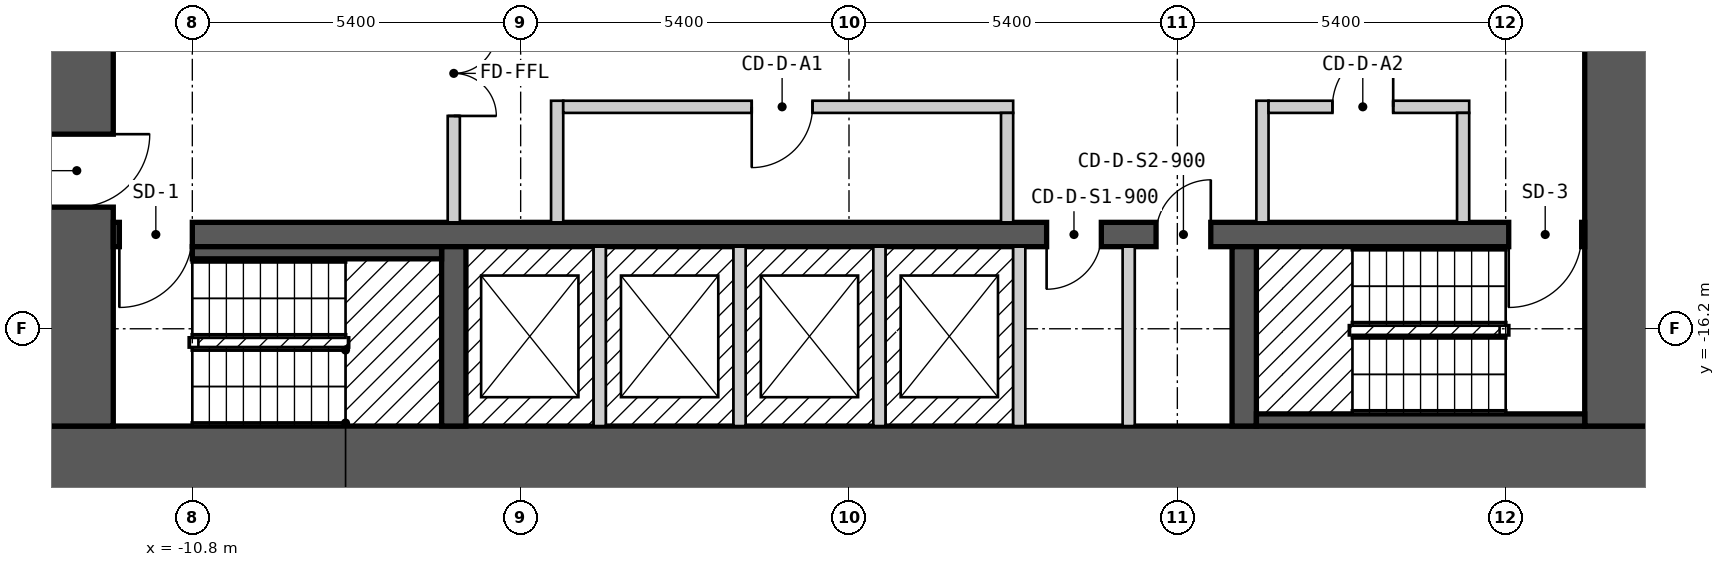
"""IFC4 building model, lengths in metres.
Left out: names, types, materials, properties, quantities, classifications, styles, units other than length and angle.
Written with IfcOpenShell. Run it as: python <this file> out.ifc"""

import sys

from ifc_helpers import new_model, si_unit, direction, frame, frame_2d, origin, place, context, subcontext, project, spatial, rectangle, extrude, element, fill, save


model = new_model("IFC4")
c1 = context("Model", 3, precision=1e-05, world=origin(), true_north=direction((0.0, 1.0)))
c2 = subcontext(c1, "Body", "Model", "MODEL_VIEW")
j1 = project(units=[si_unit("LENGTHUNIT", "METRE"), si_unit("PLANEANGLEUNIT", "RADIAN")], contexts=[c1])
p1 = place(None, origin())
s1 = spatial("IfcSite", under=j1, at=p1, CompositionType="ELEMENT")
p2 = place(p1, origin())
s2 = spatial("IfcBuilding", under=s1, at=p2, CompositionType="ELEMENT")
p3 = place(p2, frame((0.0, 0.0, 19.8)))
s3 = spatial("IfcBuildingStorey", under=s2, at=p3, CompositionType="ELEMENT", Elevation=19.8)
p4 = place(p3, frame((-13.3, -18.4, 0.0), z_axis=(0.0, 0.0, 1.0), x_axis=(1.0, 0.0, 0.0)))
e1 = element("IfcWall", 1, at=p4, inside=s3, PredefinedType="SHEAR", context=c2, shape_type="SweptSolid", body=[
    extrude(rectangle(XDim=26.6, YDim=1.2, at=frame_2d((13.3, 0.0))), origin(), (0.0, 0.0, 1.0), 2.8),
])
p5 = place(p3, frame((-12.7, -17.8, 0.0), z_axis=(0.0, 0.0, 1.0), x_axis=(0.0, 1.0, 0.0)))
e2 = element("IfcWall", 2, at=p5, inside=s3, PredefinedType="SHEAR", context=c2, shape_type="SweptSolid", body=[
    extrude(rectangle(XDim=11.6, YDim=1.2, at=frame_2d((5.8, 0.0))), origin(), (0.0, 0.0, 1.0), 2.8),
])
p6 = place(p5, frame((3.6, 0.0, 0.0)))
e3 = element("IfcOpeningElement", 3, at=p6, cuts=e2, PredefinedType="OPENING", context=c2, shape_type="SweptSolid", body=[
    extrude(rectangle(XDim=1.2, YDim=2.1, at=frame_2d((0.6, 1.05))), frame((0.0, 0.61, 0.0), z_axis=(0.0, -1.0, 0.0), x_axis=(1.0, 0.0, 0.0)), (0.0, 0.0, 1.0), 1.22),
])
p7 = place(p3, frame((12.7, -17.8, 0.0), z_axis=(0.0, 0.0, 1.0), x_axis=(0.0, 1.0, 0.0)))
e4 = element("IfcWall", 4, at=p7, inside=s3, PredefinedType="SHEAR", context=c2, shape_type="SweptSolid", body=[
    extrude(rectangle(XDim=11.6, YDim=1.2, at=frame_2d((5.8, 0.0))), origin(), (0.0, 0.0, 1.0), 2.8),
])
p8 = place(p3, frame((-12.1, -14.65, 0.0), z_axis=(0.0, 0.0, 1.0), x_axis=(1.0, 0.0, 0.0)))
e5 = element("IfcWall", 5, at=p8, inside=s3, PredefinedType="SHEAR", context=c2, shape_type="SweptSolid", body=[
    extrude(rectangle(XDim=24.2, YDim=0.4, at=frame_2d((12.1, 0.0))), origin(), (0.0, 0.0, 1.0), 2.8),
])
p9 = place(p8, frame((1.3, 0.0, 0.0), z_axis=(0.0, 0.0, 1.0), x_axis=(-1.0, 0.0, 0.0)))
e6 = element("IfcOpeningElement", 6, at=p9, cuts=e5, PredefinedType="OPENING", context=c2, shape_type="SweptSolid", body=[
    extrude(rectangle(XDim=1.2, YDim=2.1, at=frame_2d((0.6, 1.05))), frame((0.0, 0.21, 0.0), z_axis=(0.0, -1.0, 0.0), x_axis=(1.0, 0.0, 0.0)), (0.0, 0.0, 1.0), 0.42),
])
p10 = place(p8, frame((24.15, 0.0, 0.0), z_axis=(0.0, 0.0, 1.0), x_axis=(-1.0, 0.0, 0.0)))
e7 = element("IfcOpeningElement", 7, at=p10, cuts=e5, PredefinedType="OPENING", context=c2, shape_type="SweptSolid", body=[
    extrude(rectangle(XDim=1.2, YDim=2.1, at=frame_2d((0.6, 1.05))), frame((0.0, 0.21, 0.0), z_axis=(0.0, -1.0, 0.0), x_axis=(1.0, 0.0, 0.0)), (0.0, 0.0, 1.0), 0.42),
])
p11 = place(p8, frame((16.25, 0.0, 0.0), z_axis=(0.0, 0.0, 1.0), x_axis=(-1.0, 0.0, 0.0)))
e8 = element("IfcOpeningElement", 8, at=p11, cuts=e5, PredefinedType="OPENING", context=c2, shape_type="SweptSolid", body=[
    extrude(rectangle(XDim=0.9, YDim=2.1, at=frame_2d((0.45, 1.05))), frame((0.0, 0.21, 0.0), z_axis=(0.0, -1.0, 0.0), x_axis=(1.0, 0.0, 0.0)), (0.0, 0.0, 1.0), 0.42),
])
p12 = place(p8, frame((18.05, 0.0, 0.0), z_axis=(0.0, 0.0, 1.0), x_axis=(-1.0, 0.0, 0.0)))
e9 = element("IfcOpeningElement", 9, at=p12, cuts=e5, PredefinedType="OPENING", context=c2, shape_type="SweptSolid", body=[
    extrude(rectangle(XDim=0.9, YDim=2.1, at=frame_2d((0.45, 1.05))), frame((0.0, 0.21, 0.0), z_axis=(0.0, -1.0, 0.0), x_axis=(1.0, 0.0, 0.0)), (0.0, 0.0, 1.0), 0.42),
])
for number, where, z_axis, x_axis in (
    (10, (-6.5, -17.8, 0.0), (0.0, 0.0, 1.0), (0.0, 1.0, 0.0)),
    (11, (6.5, -17.8, 0.0), (0.0, 0.0, 1.0), (0.0, 1.0, 0.0)),
):
    element("IfcWall", number, at=place(p3, frame(where, z_axis=z_axis, x_axis=x_axis)), inside=s3, PredefinedType="SHEAR", context=c2, shape_type="SweptSolid", body=[
        extrude(rectangle(XDim=2.95, YDim=0.4, at=frame_2d((1.475, 0.0))), origin(), (0.0, 0.0, 1.0), 2.8),
    ])
p13 = place(p3, frame((-10.8, -14.95, 0.0), z_axis=(0.0, 0.0, 1.0), x_axis=(1.0, 0.0, 0.0)))
e12 = element("IfcWall", 12, at=p13, inside=s3, PredefinedType="SOLIDWALL", context=c2, shape_type="SweptSolid", body=[
    extrude(rectangle(XDim=4.1, YDim=0.2, at=frame_2d((2.05, 0.0))), origin(), (0.0, 0.0, 1.0), 2.8),
])
p14 = place(p3, frame((-6.5, -14.45, 0.0), z_axis=(0.0, 0.0, 1.0), x_axis=(0.0, 1.0, 0.0)))
e13 = element("IfcWall", 13, at=p14, inside=s3, PredefinedType="PARTITIONING", context=c2, shape_type="SweptSolid", body=[
    extrude(rectangle(XDim=4.9, YDim=0.2, at=frame_2d((2.45, 0.0))), origin(), (0.0, 0.0, 1.0), 2.8),
])
p15 = place(p14, frame((3.15, 0.0, 0.0), z_axis=(0.0, 0.0, 1.0), x_axis=(-1.0, 0.0, 0.0)))
e14 = element("IfcOpeningElement", 14, at=p15, cuts=e13, PredefinedType="OPENING", context=c2, shape_type="SweptSolid", body=[
    extrude(rectangle(XDim=1.4, YDim=2.1, at=frame_2d((0.7, 1.05))), frame((0.0, 0.11, 0.0), z_axis=(0.0, -1.0, 0.0), x_axis=(1.0, 0.0, 0.0)), (0.0, 0.0, 1.0), 0.22),
])
p16 = place(p3, frame((-4.8, -14.45, 0.0), z_axis=(0.0, 0.0, 1.0), x_axis=(0.0, 1.0, 0.0)))
e15 = element("IfcWall", 15, at=p16, inside=s3, PredefinedType="PARTITIONING", context=c2, shape_type="SweptSolid", body=[
    extrude(rectangle(XDim=2.0, YDim=0.2, at=frame_2d((1.0, 0.0))), origin(), (0.0, 0.0, 1.0), 2.8),
])
p17 = place(p3, frame((-4.7, -12.55, 0.0), z_axis=(0.0, 0.0, 1.0), x_axis=(1.0, 0.0, 0.0)))
e16 = element("IfcWall", 16, at=p17, inside=s3, PredefinedType="PARTITIONING", context=c2, shape_type="SweptSolid", body=[
    extrude(rectangle(XDim=7.4, YDim=0.2, at=frame_2d((3.7, 0.0))), origin(), (0.0, 0.0, 1.0), 2.8),
])
p18 = place(p17, frame((4.1, 0.0, 0.0), z_axis=(0.0, 0.0, 1.0), x_axis=(-1.0, 0.0, 0.0)))
e17 = element("IfcOpeningElement", 17, at=p18, cuts=e16, PredefinedType="OPENING", context=c2, shape_type="SweptSolid", body=[
    extrude(rectangle(XDim=1.0, YDim=2.1, at=frame_2d((0.5, 1.05))), frame((0.0, 0.11, 0.0), z_axis=(0.0, -1.0, 0.0), x_axis=(1.0, 0.0, 0.0)), (0.0, 0.0, 1.0), 0.22),
])
for number, where, z_axis, x_axis in (
    (18, (-4.1, -17.8, 0.0), (0.0, 0.0, 1.0), (0.0, 1.0, 0.0)),
    (19, (-1.8, -17.8, 0.0), (0.0, 0.0, 1.0), (0.0, 1.0, 0.0)),
    (20, (0.5, -17.8, 0.0), (0.0, 0.0, 1.0), (0.0, 1.0, 0.0)),
):
    element("IfcWall", number, at=place(p3, frame(where, z_axis=z_axis, x_axis=x_axis)), inside=s3, PredefinedType="SOLIDWALL", context=c2, shape_type="SweptSolid", body=[
        extrude(rectangle(XDim=2.95, YDim=0.2, at=frame_2d((1.475, 0.0))), origin(), (0.0, 0.0, 1.0), 2.8),
    ])
p19 = place(p3, frame((2.6, -14.45, 0.0), z_axis=(0.0, 0.0, 1.0), x_axis=(0.0, 1.0, 0.0)))
e21 = element("IfcWall", 21, at=p19, inside=s3, PredefinedType="PARTITIONING", context=c2, shape_type="SweptSolid", body=[
    extrude(rectangle(XDim=1.8, YDim=0.2, at=frame_2d((0.9, 0.0))), origin(), (0.0, 0.0, 1.0), 2.8),
])
p20 = place(p3, frame((2.8, -17.8, 0.0), z_axis=(0.0, 0.0, 1.0), x_axis=(0.0, 1.0, 0.0)))
e22 = element("IfcWall", 22, at=p20, inside=s3, PredefinedType="SOLIDWALL", context=c2, shape_type="SweptSolid", body=[
    extrude(rectangle(XDim=2.95, YDim=0.2, at=frame_2d((1.475, 0.0))), origin(), (0.0, 0.0, 1.0), 2.8),
])
p21 = place(p3, frame((4.6, -17.8, 0.0), z_axis=(0.0, 0.0, 1.0), x_axis=(0.0, 1.0, 0.0)))
e23 = element("IfcWall", 23, at=p21, inside=s3, PredefinedType="PARTITIONING", context=c2, shape_type="SweptSolid", body=[
    extrude(rectangle(XDim=2.95, YDim=0.2, at=frame_2d((1.475, 0.0))), origin(), (0.0, 0.0, 1.0), 2.8),
])
p22 = place(p3, frame((6.7, -17.7, 0.0), z_axis=(0.0, 0.0, 1.0), x_axis=(1.0, 0.0, 0.0)))
e24 = element("IfcWall", 24, at=p22, inside=s3, PredefinedType="SOLIDWALL", context=c2, shape_type="SweptSolid", body=[
    extrude(rectangle(XDim=5.4, YDim=0.2, at=frame_2d((2.7, 0.0))), origin(), (0.0, 0.0, 1.0), 2.8),
])
p23 = place(p3, frame((6.8, -14.45, 0.0), z_axis=(0.0, 0.0, 1.0), x_axis=(0.0, 1.0, 0.0)))
e25 = element("IfcWall", 25, at=p23, inside=s3, PredefinedType="PARTITIONING", context=c2, shape_type="SweptSolid", body=[
    extrude(rectangle(XDim=2.0, YDim=0.2, at=frame_2d((1.0, 0.0))), origin(), (0.0, 0.0, 1.0), 2.8),
])
p24 = place(p3, frame((6.9, -12.55, 0.0), z_axis=(0.0, 0.0, 1.0), x_axis=(1.0, 0.0, 0.0)))
e26 = element("IfcWall", 26, at=p24, inside=s3, PredefinedType="PARTITIONING", context=c2, shape_type="SweptSolid", body=[
    extrude(rectangle(XDim=3.3, YDim=0.2, at=frame_2d((1.65, 0.0))), origin(), (0.0, 0.0, 1.0), 2.8),
])
p25 = place(p24, frame((2.05, 0.0, 0.0), z_axis=(0.0, 0.0, 1.0), x_axis=(-1.0, 0.0, 0.0)))
e27 = element("IfcOpeningElement", 27, at=p25, cuts=e26, PredefinedType="OPENING", context=c2, shape_type="SweptSolid", body=[
    extrude(rectangle(XDim=1.0, YDim=2.1, at=frame_2d((0.5, 1.05))), frame((0.0, 0.11, 0.0), z_axis=(0.0, -1.0, 0.0), x_axis=(1.0, 0.0, 0.0)), (0.0, 0.0, 1.0), 0.22),
])
p26 = place(p3, frame((10.1, -14.45, 0.0), z_axis=(0.0, 0.0, 1.0), x_axis=(0.0, 1.0, 0.0)))
e28 = element("IfcWall", 28, at=p26, inside=s3, PredefinedType="PARTITIONING", context=c2, shape_type="SweptSolid", body=[
    extrude(rectangle(XDim=1.8, YDim=0.2, at=frame_2d((0.9, 0.0))), origin(), (0.0, 0.0, 1.0), 2.8),
])
p27 = place(p9, origin())
e29 = element("IfcDoor", 29, at=p27, inside=s3, OperationType="SINGLE_SWING_RIGHT", PredefinedType="DOOR", context=c2, shape_type="SweptSolid", body=[
    extrude(rectangle(XDim=1.2, YDim=2.1, at=frame_2d((0.6, 1.05))), frame((0.0, 0.025, 0.0), z_axis=(0.0, -1.0, 0.0), x_axis=(1.0, 0.0, 0.0)), (0.0, 0.0, 1.0), 0.05),
])
fill(e6, e29)
p28 = place(p10, origin())
e30 = element("IfcDoor", 30, at=p28, inside=s3, OperationType="SINGLE_SWING_RIGHT", PredefinedType="DOOR", context=c2, shape_type="SweptSolid", body=[
    extrude(rectangle(XDim=1.2, YDim=2.1, at=frame_2d((0.6, 1.05))), frame((0.0, 0.025, 0.0), z_axis=(0.0, -1.0, 0.0), x_axis=(1.0, 0.0, 0.0)), (0.0, 0.0, 1.0), 0.05),
])
fill(e7, e30)
p29 = place(p6, origin())
e31 = element("IfcDoor", 31, at=p29, inside=s3, OperationType="SINGLE_SWING_RIGHT", PredefinedType="DOOR", context=c2, shape_type="SweptSolid", body=[
    extrude(rectangle(XDim=1.2, YDim=2.1, at=frame_2d((0.6, 1.05))), frame((0.0, 0.025, 0.0), z_axis=(0.0, -1.0, 0.0), x_axis=(1.0, 0.0, 0.0)), (0.0, 0.0, 1.0), 0.05),
])
fill(e3, e31)
p30 = place(p15, origin())
e32 = element("IfcDoor", 32, at=p30, inside=s3, OperationType="DOUBLE_DOOR_SINGLE_SWING", PredefinedType="DOOR", context=c2, shape_type="SweptSolid", body=[
    extrude(rectangle(XDim=1.4, YDim=2.1, at=frame_2d((0.7, 1.05))), frame((0.0, 0.025, 0.0), z_axis=(0.0, -1.0, 0.0), x_axis=(1.0, 0.0, 0.0)), (0.0, 0.0, 1.0), 0.05),
])
fill(e14, e32)
p31 = place(p18, origin())
e33 = element("IfcDoor", 33, at=p31, inside=s3, OperationType="SINGLE_SWING_RIGHT", PredefinedType="DOOR", context=c2, shape_type="SweptSolid", body=[
    extrude(rectangle(XDim=1.0, YDim=2.1, at=frame_2d((0.5, 1.05))), frame((0.0, 0.025, 0.0), z_axis=(0.0, -1.0, 0.0), x_axis=(1.0, 0.0, 0.0)), (0.0, 0.0, 1.0), 0.05),
])
fill(e17, e33)
p32 = place(p25, origin())
e34 = element("IfcDoor", 34, at=p32, inside=s3, OperationType="SINGLE_SWING_LEFT", PredefinedType="DOOR", context=c2, shape_type="SweptSolid", body=[
    extrude(rectangle(XDim=1.0, YDim=2.1, at=frame_2d((0.5, 1.05))), frame((0.0, 0.025, 0.0), z_axis=(0.0, -1.0, 0.0), x_axis=(1.0, 0.0, 0.0)), (0.0, 0.0, 1.0), 0.05),
])
fill(e27, e34)
p33 = place(p11, origin())
e35 = element("IfcDoor", 35, at=p33, inside=s3, OperationType="SINGLE_SWING_RIGHT", PredefinedType="DOOR", context=c2, shape_type="SweptSolid", body=[
    extrude(rectangle(XDim=0.9, YDim=2.1, at=frame_2d((0.45, 1.05))), frame((0.0, 0.025, 0.0), z_axis=(0.0, -1.0, 0.0), x_axis=(1.0, 0.0, 0.0)), (0.0, 0.0, 1.0), 0.05),
])
fill(e8, e35)
p34 = place(p12, origin())
e36 = element("IfcDoor", 36, at=p34, inside=s3, OperationType="SINGLE_SWING_LEFT", PredefinedType="DOOR", context=c2, shape_type="SweptSolid", body=[
    extrude(rectangle(XDim=0.9, YDim=2.1, at=frame_2d((0.45, 1.05))), frame((0.0, 0.025, 0.0), z_axis=(0.0, -1.0, 0.0), x_axis=(1.0, 0.0, 0.0)), (0.0, 0.0, 1.0), 0.05),
])
fill(e9, e36)
save(model, sys.argv[1])
